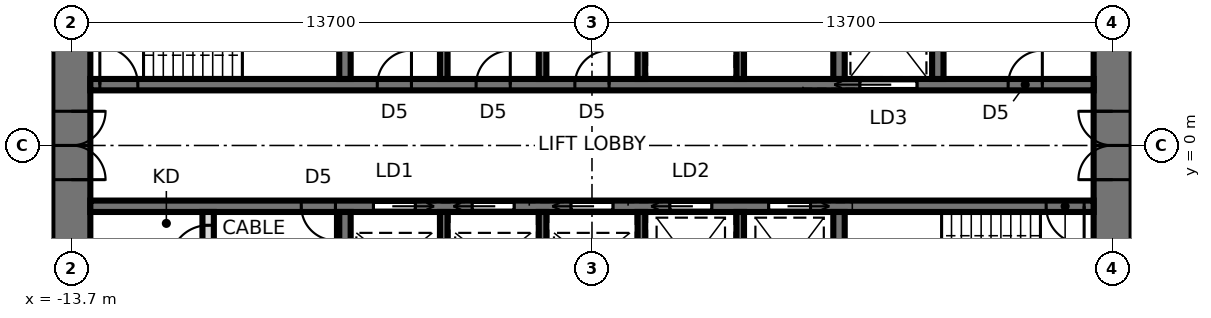
"""IFC4 building model, lengths in metres.
Left out: names, types, materials, properties, quantities, classifications, styles, units other than length and angle.
Written with IfcOpenShell. Run it as: python <this file> out.ifc"""

import sys

from ifc_helpers import new_model, si_unit, direction, frame, frame_2d, origin, place, context, subcontext, project, spatial, rectangle, extrude, element, fill, save


model = new_model("IFC4")
c1 = context("Model", 3, precision=1e-05, world=origin(), true_north=direction((0.0, 1.0)))
c2 = subcontext(c1, "Body", "Model", "MODEL_VIEW")
j1 = project(units=[si_unit("LENGTHUNIT", "METRE"), si_unit("PLANEANGLEUNIT", "RADIAN")], contexts=[c1])
p1 = place(None, origin())
s1 = spatial("IfcSite", under=j1, at=p1, CompositionType="ELEMENT")
p2 = place(p1, origin())
s2 = spatial("IfcBuilding", under=s1, at=p2, CompositionType="ELEMENT")
p3 = place(p2, frame((0.0, 0.0, 115.8)))
s3 = spatial("IfcBuildingStorey", under=s2, at=p3, CompositionType="ELEMENT", Elevation=115.8)
p4 = place(p3, frame((13.7, -9.5, 0.0), z_axis=(0.0, 0.0, 1.0), x_axis=(0.0, 1.0, 0.0)))
e1 = element("IfcWall", 1, at=p4, inside=s3, PredefinedType="SHEAR", context=c2, shape_type="SweptSolid", body=[
    extrude(rectangle(XDim=19.0, YDim=1.0, at=frame_2d((9.5, 0.0))), origin(), (0.0, 0.0, 1.0), 3.9),
])
p5 = place(p4, frame((8.6, 0.0, 0.0)))
e2 = element("IfcOpeningElement", 2, at=p5, cuts=e1, PredefinedType="OPENING", context=c2, shape_type="SweptSolid", body=[
    extrude(rectangle(XDim=1.8, YDim=2.4, at=frame_2d((0.9, 1.2))), frame((0.0, 0.51, 0.0), z_axis=(0.0, -1.0, 0.0), x_axis=(1.0, 0.0, 0.0)), (0.0, 0.0, 1.0), 1.02),
])
p6 = place(p3, frame((-13.7, 9.5, 0.0), z_axis=(0.0, 0.0, 1.0), x_axis=(0.0, -1.0, 0.0)))
e3 = element("IfcWall", 3, at=p6, inside=s3, PredefinedType="SHEAR", context=c2, shape_type="SweptSolid", body=[
    extrude(rectangle(XDim=19.0, YDim=1.0, at=frame_2d((9.5, 0.0))), origin(), (0.0, 0.0, 1.0), 3.9),
])
p7 = place(p6, frame((8.6, 0.0, 0.0)))
e4 = element("IfcOpeningElement", 4, at=p7, cuts=e3, PredefinedType="OPENING", context=c2, shape_type="SweptSolid", body=[
    extrude(rectangle(XDim=1.8, YDim=2.4, at=frame_2d((0.9, 1.2))), frame((0.0, 0.51, 0.0), z_axis=(0.0, -1.0, 0.0), x_axis=(1.0, 0.0, 0.0)), (0.0, 0.0, 1.0), 1.02),
])
p8 = place(p3, frame((-13.2, 1.6, 0.0), z_axis=(0.0, 0.0, 1.0), x_axis=(1.0, 0.0, 0.0)))
e5 = element("IfcWall", 5, at=p8, inside=s3, PredefinedType="SHEAR", context=c2, shape_type="SweptSolid", body=[
    extrude(rectangle(XDim=26.4, YDim=0.3, at=frame_2d((13.2, 0.0))), origin(), (0.0, 0.0, 1.0), 3.9),
])
p9 = place(p8, frame((0.25, 0.0, 0.0)))
e6 = element("IfcOpeningElement", 6, at=p9, cuts=e5, PredefinedType="OPENING", context=c2, shape_type="SweptSolid", body=[
    extrude(rectangle(XDim=1.0, YDim=2.1, at=frame_2d((0.5, 1.05))), frame((0.0, 0.16, 0.0), z_axis=(0.0, -1.0, 0.0), x_axis=(1.0, 0.0, 0.0)), (0.0, 0.0, 1.0), 0.32),
])
p10 = place(p8, frame((20.25, 0.0, 0.0)))
e7 = element("IfcOpeningElement", 7, at=p10, cuts=e5, PredefinedType="OPENING", context=c2, shape_type="SweptSolid", body=[
    extrude(rectangle(XDim=1.5, YDim=2.4, at=frame_2d((0.75, 1.2))), frame((0.0, 0.16, 0.0), z_axis=(0.0, -1.0, 0.0), x_axis=(1.0, 0.0, 0.0)), (0.0, 0.0, 1.0), 0.32),
])
p11 = place(p8, frame((7.55, 0.0, 0.0)))
e8 = element("IfcOpeningElement", 8, at=p11, cuts=e5, PredefinedType="OPENING", context=c2, shape_type="SweptSolid", body=[
    extrude(rectangle(XDim=0.9, YDim=2.1, at=frame_2d((0.45, 1.05))), frame((0.0, 0.16, 0.0), z_axis=(0.0, -1.0, 0.0), x_axis=(1.0, 0.0, 0.0)), (0.0, 0.0, 1.0), 0.32),
])
p12 = place(p8, frame((10.15, 0.0, 0.0)))
e9 = element("IfcOpeningElement", 9, at=p12, cuts=e5, PredefinedType="OPENING", context=c2, shape_type="SweptSolid", body=[
    extrude(rectangle(XDim=0.9, YDim=2.1, at=frame_2d((0.45, 1.05))), frame((0.0, 0.16, 0.0), z_axis=(0.0, -1.0, 0.0), x_axis=(1.0, 0.0, 0.0)), (0.0, 0.0, 1.0), 0.32),
])
p13 = place(p8, frame((12.75, 0.0, 0.0)))
e10 = element("IfcOpeningElement", 10, at=p13, cuts=e5, PredefinedType="OPENING", context=c2, shape_type="SweptSolid", body=[
    extrude(rectangle(XDim=0.9, YDim=2.1, at=frame_2d((0.45, 1.05))), frame((0.0, 0.16, 0.0), z_axis=(0.0, -1.0, 0.0), x_axis=(1.0, 0.0, 0.0)), (0.0, 0.0, 1.0), 0.32),
])
p14 = place(p8, frame((24.15, 0.0, 0.0)))
e11 = element("IfcOpeningElement", 11, at=p14, cuts=e5, PredefinedType="OPENING", context=c2, shape_type="SweptSolid", body=[
    extrude(rectangle(XDim=0.9, YDim=2.1, at=frame_2d((0.45, 1.05))), frame((0.0, 0.16, 0.0), z_axis=(0.0, -1.0, 0.0), x_axis=(1.0, 0.0, 0.0)), (0.0, 0.0, 1.0), 0.32),
])
p15 = place(p3, frame((-13.2, -1.6, 0.0), z_axis=(0.0, 0.0, 1.0), x_axis=(1.0, 0.0, 0.0)))
e12 = element("IfcWall", 12, at=p15, inside=s3, PredefinedType="SHEAR", context=c2, shape_type="SweptSolid", body=[
    extrude(rectangle(XDim=26.4, YDim=0.3, at=frame_2d((13.2, 0.0))), origin(), (0.0, 0.0, 1.0), 3.9),
])
p16 = place(p15, frame((25.15, 0.0, 0.0)))
e13 = element("IfcOpeningElement", 13, at=p16, cuts=e12, PredefinedType="OPENING", context=c2, shape_type="SweptSolid", body=[
    extrude(rectangle(XDim=1.0, YDim=2.1, at=frame_2d((0.5, 1.05))), frame((0.0, 0.16, 0.0), z_axis=(0.0, -1.0, 0.0), x_axis=(1.0, 0.0, 0.0)), (0.0, 0.0, 1.0), 0.32),
])
p17 = place(p15, frame((7.45, 0.0, 0.0)))
e14 = element("IfcOpeningElement", 14, at=p17, cuts=e12, PredefinedType="OPENING", context=c2, shape_type="SweptSolid", body=[
    extrude(rectangle(XDim=1.1, YDim=2.3, at=frame_2d((0.55, 1.15))), frame((0.0, 0.16, 0.0), z_axis=(0.0, -1.0, 0.0), x_axis=(1.0, 0.0, 0.0)), (0.0, 0.0, 1.0), 0.32),
])
p18 = place(p15, frame((10.05, 0.0, 0.0)))
e15 = element("IfcOpeningElement", 15, at=p18, cuts=e12, PredefinedType="OPENING", context=c2, shape_type="SweptSolid", body=[
    extrude(rectangle(XDim=1.1, YDim=2.3, at=frame_2d((0.55, 1.15))), frame((0.0, 0.16, 0.0), z_axis=(0.0, -1.0, 0.0), x_axis=(1.0, 0.0, 0.0)), (0.0, 0.0, 1.0), 0.32),
])
p19 = place(p15, frame((12.65, 0.0, 0.0)))
e16 = element("IfcOpeningElement", 16, at=p19, cuts=e12, PredefinedType="OPENING", context=c2, shape_type="SweptSolid", body=[
    extrude(rectangle(XDim=1.1, YDim=2.3, at=frame_2d((0.55, 1.15))), frame((0.0, 0.16, 0.0), z_axis=(0.0, -1.0, 0.0), x_axis=(1.0, 0.0, 0.0)), (0.0, 0.0, 1.0), 0.32),
])
p20 = place(p15, frame((15.25, 0.0, 0.0)))
e17 = element("IfcOpeningElement", 17, at=p20, cuts=e12, PredefinedType="OPENING", context=c2, shape_type="SweptSolid", body=[
    extrude(rectangle(XDim=1.1, YDim=2.3, at=frame_2d((0.55, 1.15))), frame((0.0, 0.16, 0.0), z_axis=(0.0, -1.0, 0.0), x_axis=(1.0, 0.0, 0.0)), (0.0, 0.0, 1.0), 0.32),
])
p21 = place(p15, frame((17.85, 0.0, 0.0)))
e18 = element("IfcOpeningElement", 18, at=p21, cuts=e12, PredefinedType="OPENING", context=c2, shape_type="SweptSolid", body=[
    extrude(rectangle(XDim=1.1, YDim=2.3, at=frame_2d((0.55, 1.15))), frame((0.0, 0.16, 0.0), z_axis=(0.0, -1.0, 0.0), x_axis=(1.0, 0.0, 0.0)), (0.0, 0.0, 1.0), 0.32),
])
p22 = place(p15, frame((5.55, 0.0, 0.0)))
e19 = element("IfcOpeningElement", 19, at=p22, cuts=e12, PredefinedType="OPENING", context=c2, shape_type="SweptSolid", body=[
    extrude(rectangle(XDim=0.9, YDim=2.1, at=frame_2d((0.45, 1.05))), frame((0.0, 0.16, 0.0), z_axis=(0.0, -1.0, 0.0), x_axis=(1.0, 0.0, 0.0)), (0.0, 0.0, 1.0), 0.32),
])
for number, where, z_axis, x_axis in (
    (20, (-6.5, 1.75, 0.0), (0.0, 0.0, 1.0), (0.0, 1.0, 0.0)),
    (21, (6.5, 1.75, 0.0), (0.0, 0.0, 1.0), (0.0, 1.0, 0.0)),
):
    element("IfcWall", number, at=place(p3, frame(where, z_axis=z_axis, x_axis=x_axis)), inside=s3, PredefinedType="SHEAR", context=c2, shape_type="SweptSolid", body=[
        extrude(rectangle(XDim=2.7, YDim=0.3, at=frame_2d((1.35, 0.0))), origin(), (0.0, 0.0, 1.0), 3.9),
    ])
for number, where, z_axis, x_axis in (
    (22, (-3.9, 1.75, 0.0), (0.0, 0.0, 1.0), (0.0, 1.0, 0.0)),
    (23, (-1.3, 1.75, 0.0), (0.0, 0.0, 1.0), (0.0, 1.0, 0.0)),
    (24, (1.3, 1.75, 0.0), (0.0, 0.0, 1.0), (0.0, 1.0, 0.0)),
    (25, (3.9, 1.75, 0.0), (0.0, 0.0, 1.0), (0.0, 1.0, 0.0)),
):
    element("IfcWall", number, at=place(p3, frame(where, z_axis=z_axis, x_axis=x_axis)), inside=s3, PredefinedType="SHEAR", context=c2, shape_type="SweptSolid", body=[
        extrude(rectangle(XDim=2.7, YDim=0.2, at=frame_2d((1.35, 0.0))), origin(), (0.0, 0.0, 1.0), 3.9),
    ])
for number, where, z_axis, x_axis in (
    (26, (-6.5, -1.75, 0.0), (0.0, 0.0, 1.0), (0.0, -1.0, 0.0)),
    (27, (6.5, -1.75, 0.0), (0.0, 0.0, 1.0), (0.0, -1.0, 0.0)),
):
    element("IfcWall", number, at=place(p3, frame(where, z_axis=z_axis, x_axis=x_axis)), inside=s3, PredefinedType="SHEAR", context=c2, shape_type="SweptSolid", body=[
        extrude(rectangle(XDim=2.7, YDim=0.3, at=frame_2d((1.35, 0.0))), origin(), (0.0, 0.0, 1.0), 3.9),
    ])
for number, where, z_axis, x_axis in (
    (28, (-3.9, -1.75, 0.0), (0.0, 0.0, 1.0), (0.0, -1.0, 0.0)),
    (29, (-1.3, -1.75, 0.0), (0.0, 0.0, 1.0), (0.0, -1.0, 0.0)),
    (30, (1.3, -1.75, 0.0), (0.0, 0.0, 1.0), (0.0, -1.0, 0.0)),
    (31, (3.9, -1.75, 0.0), (0.0, 0.0, 1.0), (0.0, -1.0, 0.0)),
):
    element("IfcWall", number, at=place(p3, frame(where, z_axis=z_axis, x_axis=x_axis)), inside=s3, PredefinedType="SHEAR", context=c2, shape_type="SweptSolid", body=[
        extrude(rectangle(XDim=2.7, YDim=0.2, at=frame_2d((1.35, 0.0))), origin(), (0.0, 0.0, 1.0), 3.9),
    ])
p23 = place(p3, frame((9.1, 1.75, 0.0), z_axis=(0.0, 0.0, 1.0), x_axis=(0.0, 1.0, 0.0)))
e32 = element("IfcWall", 32, at=p23, inside=s3, PredefinedType="SHEAR", context=c2, shape_type="SweptSolid", body=[
    extrude(rectangle(XDim=2.7, YDim=0.3, at=frame_2d((1.35, 0.0))), origin(), (0.0, 0.0, 1.0), 3.9),
])
p24 = place(p3, frame((-10.1, -3.25, 0.0), z_axis=(0.0, 0.0, 1.0), x_axis=(0.0, 1.0, 0.0)))
e33 = element("IfcWall", 33, at=p24, inside=s3, PredefinedType="PARTITIONING", context=c2, shape_type="SweptSolid", body=[
    extrude(rectangle(XDim=1.5, YDim=0.3, at=frame_2d((0.75, 0.0))), origin(), (0.0, 0.0, 1.0), 3.74),
])
p25 = place(p24, frame((0.15, 0.0, 0.0)))
e34 = element("IfcOpeningElement", 34, at=p25, cuts=e33, PredefinedType="OPENING", context=c2, shape_type="SweptSolid", body=[
    extrude(rectangle(XDim=1.0, YDim=2.4, at=frame_2d((0.5, 1.2))), frame((0.0, 0.16, 0.0), z_axis=(0.0, -1.0, 0.0), x_axis=(1.0, 0.0, 0.0)), (0.0, 0.0, 1.0), 0.32),
])
p26 = place(p7, origin())
e35 = element("IfcDoor", 35, at=p26, inside=s3, OperationType="DOUBLE_DOOR_SINGLE_SWING", PredefinedType="DOOR", context=c2, shape_type="SweptSolid", body=[
    extrude(rectangle(XDim=1.72, YDim=2.36, at=frame_2d((0.9, 1.18))), frame((0.0, 0.025, 0.0), z_axis=(0.0, -1.0, 0.0), x_axis=(1.0, 0.0, 0.0)), (0.0, 0.0, 1.0), 0.05),
    extrude(rectangle(XDim=0.04, YDim=2.4, at=frame_2d((0.02, 1.2))), frame((0.0, 0.25, 0.0), z_axis=(0.0, -1.0, 0.0), x_axis=(1.0, 0.0, 0.0)), (0.0, 0.0, 1.0), 0.5),
    extrude(rectangle(XDim=0.04, YDim=2.4, at=frame_2d((1.78, 1.2))), frame((0.0, 0.25, 0.0), z_axis=(0.0, -1.0, 0.0), x_axis=(1.0, 0.0, 0.0)), (0.0, 0.0, 1.0), 0.5),
    extrude(rectangle(XDim=1.72, YDim=0.04, at=frame_2d((0.9, 2.38))), frame((0.0, 0.25, 0.0), z_axis=(0.0, -1.0, 0.0), x_axis=(1.0, 0.0, 0.0)), (0.0, 0.0, 1.0), 0.5),
])
fill(e4, e35)
p27 = place(p5, origin())
e36 = element("IfcDoor", 36, at=p27, inside=s3, OperationType="DOUBLE_DOOR_SINGLE_SWING", PredefinedType="DOOR", context=c2, shape_type="SweptSolid", body=[
    extrude(rectangle(XDim=1.72, YDim=2.36, at=frame_2d((0.9, 1.18))), frame((0.0, 0.025, 0.0), z_axis=(0.0, -1.0, 0.0), x_axis=(1.0, 0.0, 0.0)), (0.0, 0.0, 1.0), 0.05),
    extrude(rectangle(XDim=0.04, YDim=2.4, at=frame_2d((0.02, 1.2))), frame((0.0, 0.25, 0.0), z_axis=(0.0, -1.0, 0.0), x_axis=(1.0, 0.0, 0.0)), (0.0, 0.0, 1.0), 0.5),
    extrude(rectangle(XDim=0.04, YDim=2.4, at=frame_2d((1.78, 1.2))), frame((0.0, 0.25, 0.0), z_axis=(0.0, -1.0, 0.0), x_axis=(1.0, 0.0, 0.0)), (0.0, 0.0, 1.0), 0.5),
    extrude(rectangle(XDim=1.72, YDim=0.04, at=frame_2d((0.9, 2.38))), frame((0.0, 0.25, 0.0), z_axis=(0.0, -1.0, 0.0), x_axis=(1.0, 0.0, 0.0)), (0.0, 0.0, 1.0), 0.5),
])
fill(e2, e36)
p28 = place(p9, origin())
e37 = element("IfcDoor", 37, at=p28, inside=s3, OperationType="SINGLE_SWING_LEFT", PredefinedType="DOOR", context=c2, shape_type="SweptSolid", body=[
    extrude(rectangle(XDim=1.0, YDim=2.1, at=frame_2d((0.5, 1.05))), frame((0.0, 0.025, 0.0), z_axis=(0.0, -1.0, 0.0), x_axis=(1.0, 0.0, 0.0)), (0.0, 0.0, 1.0), 0.05),
])
fill(e6, e37)
p29 = place(p16, frame((1.0, 0.0, 0.0), z_axis=(0.0, 0.0, 1.0), x_axis=(-1.0, 0.0, 0.0)))
e38 = element("IfcDoor", 38, at=p29, inside=s3, OperationType="SINGLE_SWING_LEFT", PredefinedType="DOOR", context=c2, shape_type="SweptSolid", body=[
    extrude(rectangle(XDim=1.0, YDim=2.1, at=frame_2d((0.5, 1.05))), frame((0.0, 0.025, 0.0), z_axis=(0.0, -1.0, 0.0), x_axis=(1.0, 0.0, 0.0)), (0.0, 0.0, 1.0), 0.05),
])
fill(e13, e38)
p30 = place(p10, origin())
e39 = element("IfcDoor", 39, at=p30, inside=s3, OperationType="SLIDING_TO_LEFT", PredefinedType="DOOR", context=c2, shape_type="SweptSolid", body=[
    extrude(rectangle(XDim=1.5, YDim=2.4, at=frame_2d((0.75, 1.2))), frame((0.0, 0.025, 0.0), z_axis=(0.0, -1.0, 0.0), x_axis=(1.0, 0.0, 0.0)), (0.0, 0.0, 1.0), 0.05),
])
fill(e7, e39)
p31 = place(p11, origin())
e40 = element("IfcDoor", 40, at=p31, inside=s3, OperationType="SINGLE_SWING_RIGHT", PredefinedType="DOOR", context=c2, shape_type="SweptSolid", body=[
    extrude(rectangle(XDim=0.9, YDim=2.1, at=frame_2d((0.45, 1.05))), frame((0.0, 0.025, 0.0), z_axis=(0.0, -1.0, 0.0), x_axis=(1.0, 0.0, 0.0)), (0.0, 0.0, 1.0), 0.05),
])
fill(e8, e40)
p32 = place(p12, origin())
e41 = element("IfcDoor", 41, at=p32, inside=s3, OperationType="SINGLE_SWING_RIGHT", PredefinedType="DOOR", context=c2, shape_type="SweptSolid", body=[
    extrude(rectangle(XDim=0.9, YDim=2.1, at=frame_2d((0.45, 1.05))), frame((0.0, 0.025, 0.0), z_axis=(0.0, -1.0, 0.0), x_axis=(1.0, 0.0, 0.0)), (0.0, 0.0, 1.0), 0.05),
])
fill(e9, e41)
p33 = place(p13, origin())
e42 = element("IfcDoor", 42, at=p33, inside=s3, OperationType="SINGLE_SWING_RIGHT", PredefinedType="DOOR", context=c2, shape_type="SweptSolid", body=[
    extrude(rectangle(XDim=0.9, YDim=2.1, at=frame_2d((0.45, 1.05))), frame((0.0, 0.025, 0.0), z_axis=(0.0, -1.0, 0.0), x_axis=(1.0, 0.0, 0.0)), (0.0, 0.0, 1.0), 0.05),
])
fill(e10, e42)
p34 = place(p17, frame((1.1, 0.0, 0.0), z_axis=(0.0, 0.0, 1.0), x_axis=(-1.0, 0.0, 0.0)))
e43 = element("IfcDoor", 43, at=p34, inside=s3, OperationType="SLIDING_TO_LEFT", PredefinedType="DOOR", context=c2, shape_type="SweptSolid", body=[
    extrude(rectangle(XDim=1.1, YDim=2.3, at=frame_2d((0.55, 1.15))), frame((0.0, 0.025, 0.0), z_axis=(0.0, -1.0, 0.0), x_axis=(1.0, 0.0, 0.0)), (0.0, 0.0, 1.0), 0.05),
])
fill(e14, e43)
p35 = place(p18, frame((1.1, 0.0, 0.0), z_axis=(0.0, 0.0, 1.0), x_axis=(-1.0, 0.0, 0.0)))
e44 = element("IfcDoor", 44, at=p35, inside=s3, OperationType="SLIDING_TO_RIGHT", PredefinedType="DOOR", context=c2, shape_type="SweptSolid", body=[
    extrude(rectangle(XDim=1.1, YDim=2.3, at=frame_2d((0.55, 1.15))), frame((0.0, 0.025, 0.0), z_axis=(0.0, -1.0, 0.0), x_axis=(1.0, 0.0, 0.0)), (0.0, 0.0, 1.0), 0.05),
])
fill(e15, e44)
p36 = place(p19, frame((1.1, 0.0, 0.0), z_axis=(0.0, 0.0, 1.0), x_axis=(-1.0, 0.0, 0.0)))
e45 = element("IfcDoor", 45, at=p36, inside=s3, OperationType="SLIDING_TO_RIGHT", PredefinedType="DOOR", context=c2, shape_type="SweptSolid", body=[
    extrude(rectangle(XDim=1.1, YDim=2.3, at=frame_2d((0.55, 1.15))), frame((0.0, 0.025, 0.0), z_axis=(0.0, -1.0, 0.0), x_axis=(1.0, 0.0, 0.0)), (0.0, 0.0, 1.0), 0.05),
])
fill(e16, e45)
p37 = place(p20, frame((1.1, 0.0, 0.0), z_axis=(0.0, 0.0, 1.0), x_axis=(-1.0, 0.0, 0.0)))
e46 = element("IfcDoor", 46, at=p37, inside=s3, OperationType="SLIDING_TO_RIGHT", PredefinedType="DOOR", context=c2, shape_type="SweptSolid", body=[
    extrude(rectangle(XDim=1.1, YDim=2.3, at=frame_2d((0.55, 1.15))), frame((0.0, 0.025, 0.0), z_axis=(0.0, -1.0, 0.0), x_axis=(1.0, 0.0, 0.0)), (0.0, 0.0, 1.0), 0.05),
])
fill(e17, e46)
p38 = place(p21, frame((1.1, 0.0, 0.0), z_axis=(0.0, 0.0, 1.0), x_axis=(-1.0, 0.0, 0.0)))
e47 = element("IfcDoor", 47, at=p38, inside=s3, OperationType="SLIDING_TO_LEFT", PredefinedType="DOOR", context=c2, shape_type="SweptSolid", body=[
    extrude(rectangle(XDim=1.1, YDim=2.3, at=frame_2d((0.55, 1.15))), frame((0.0, 0.025, 0.0), z_axis=(0.0, -1.0, 0.0), x_axis=(1.0, 0.0, 0.0)), (0.0, 0.0, 1.0), 0.05),
])
fill(e18, e47)
p39 = place(p14, origin())
e48 = element("IfcDoor", 48, at=p39, inside=s3, OperationType="SINGLE_SWING_RIGHT", PredefinedType="DOOR", context=c2, shape_type="SweptSolid", body=[
    extrude(rectangle(XDim=0.9, YDim=2.1, at=frame_2d((0.45, 1.05))), frame((0.0, 0.025, 0.0), z_axis=(0.0, -1.0, 0.0), x_axis=(1.0, 0.0, 0.0)), (0.0, 0.0, 1.0), 0.05),
])
fill(e11, e48)
p40 = place(p22, frame((0.9, 0.0, 0.0), z_axis=(0.0, 0.0, 1.0), x_axis=(-1.0, 0.0, 0.0)))
e49 = element("IfcDoor", 49, at=p40, inside=s3, OperationType="SINGLE_SWING_LEFT", PredefinedType="DOOR", context=c2, shape_type="SweptSolid", body=[
    extrude(rectangle(XDim=0.9, YDim=2.1, at=frame_2d((0.45, 1.05))), frame((0.0, 0.025, 0.0), z_axis=(0.0, -1.0, 0.0), x_axis=(1.0, 0.0, 0.0)), (0.0, 0.0, 1.0), 0.05),
])
fill(e19, e49)
p41 = place(p25, origin())
e50 = element("IfcDoor", 50, at=p41, inside=s3, OperationType="SINGLE_SWING_LEFT", PredefinedType="DOOR", context=c2, shape_type="SweptSolid", body=[
    extrude(rectangle(XDim=1.0, YDim=2.4, at=frame_2d((0.5, 1.2))), frame((0.0, 0.025, 0.0), z_axis=(0.0, -1.0, 0.0), x_axis=(1.0, 0.0, 0.0)), (0.0, 0.0, 1.0), 0.05),
])
fill(e34, e50)
save(model, sys.argv[1])
